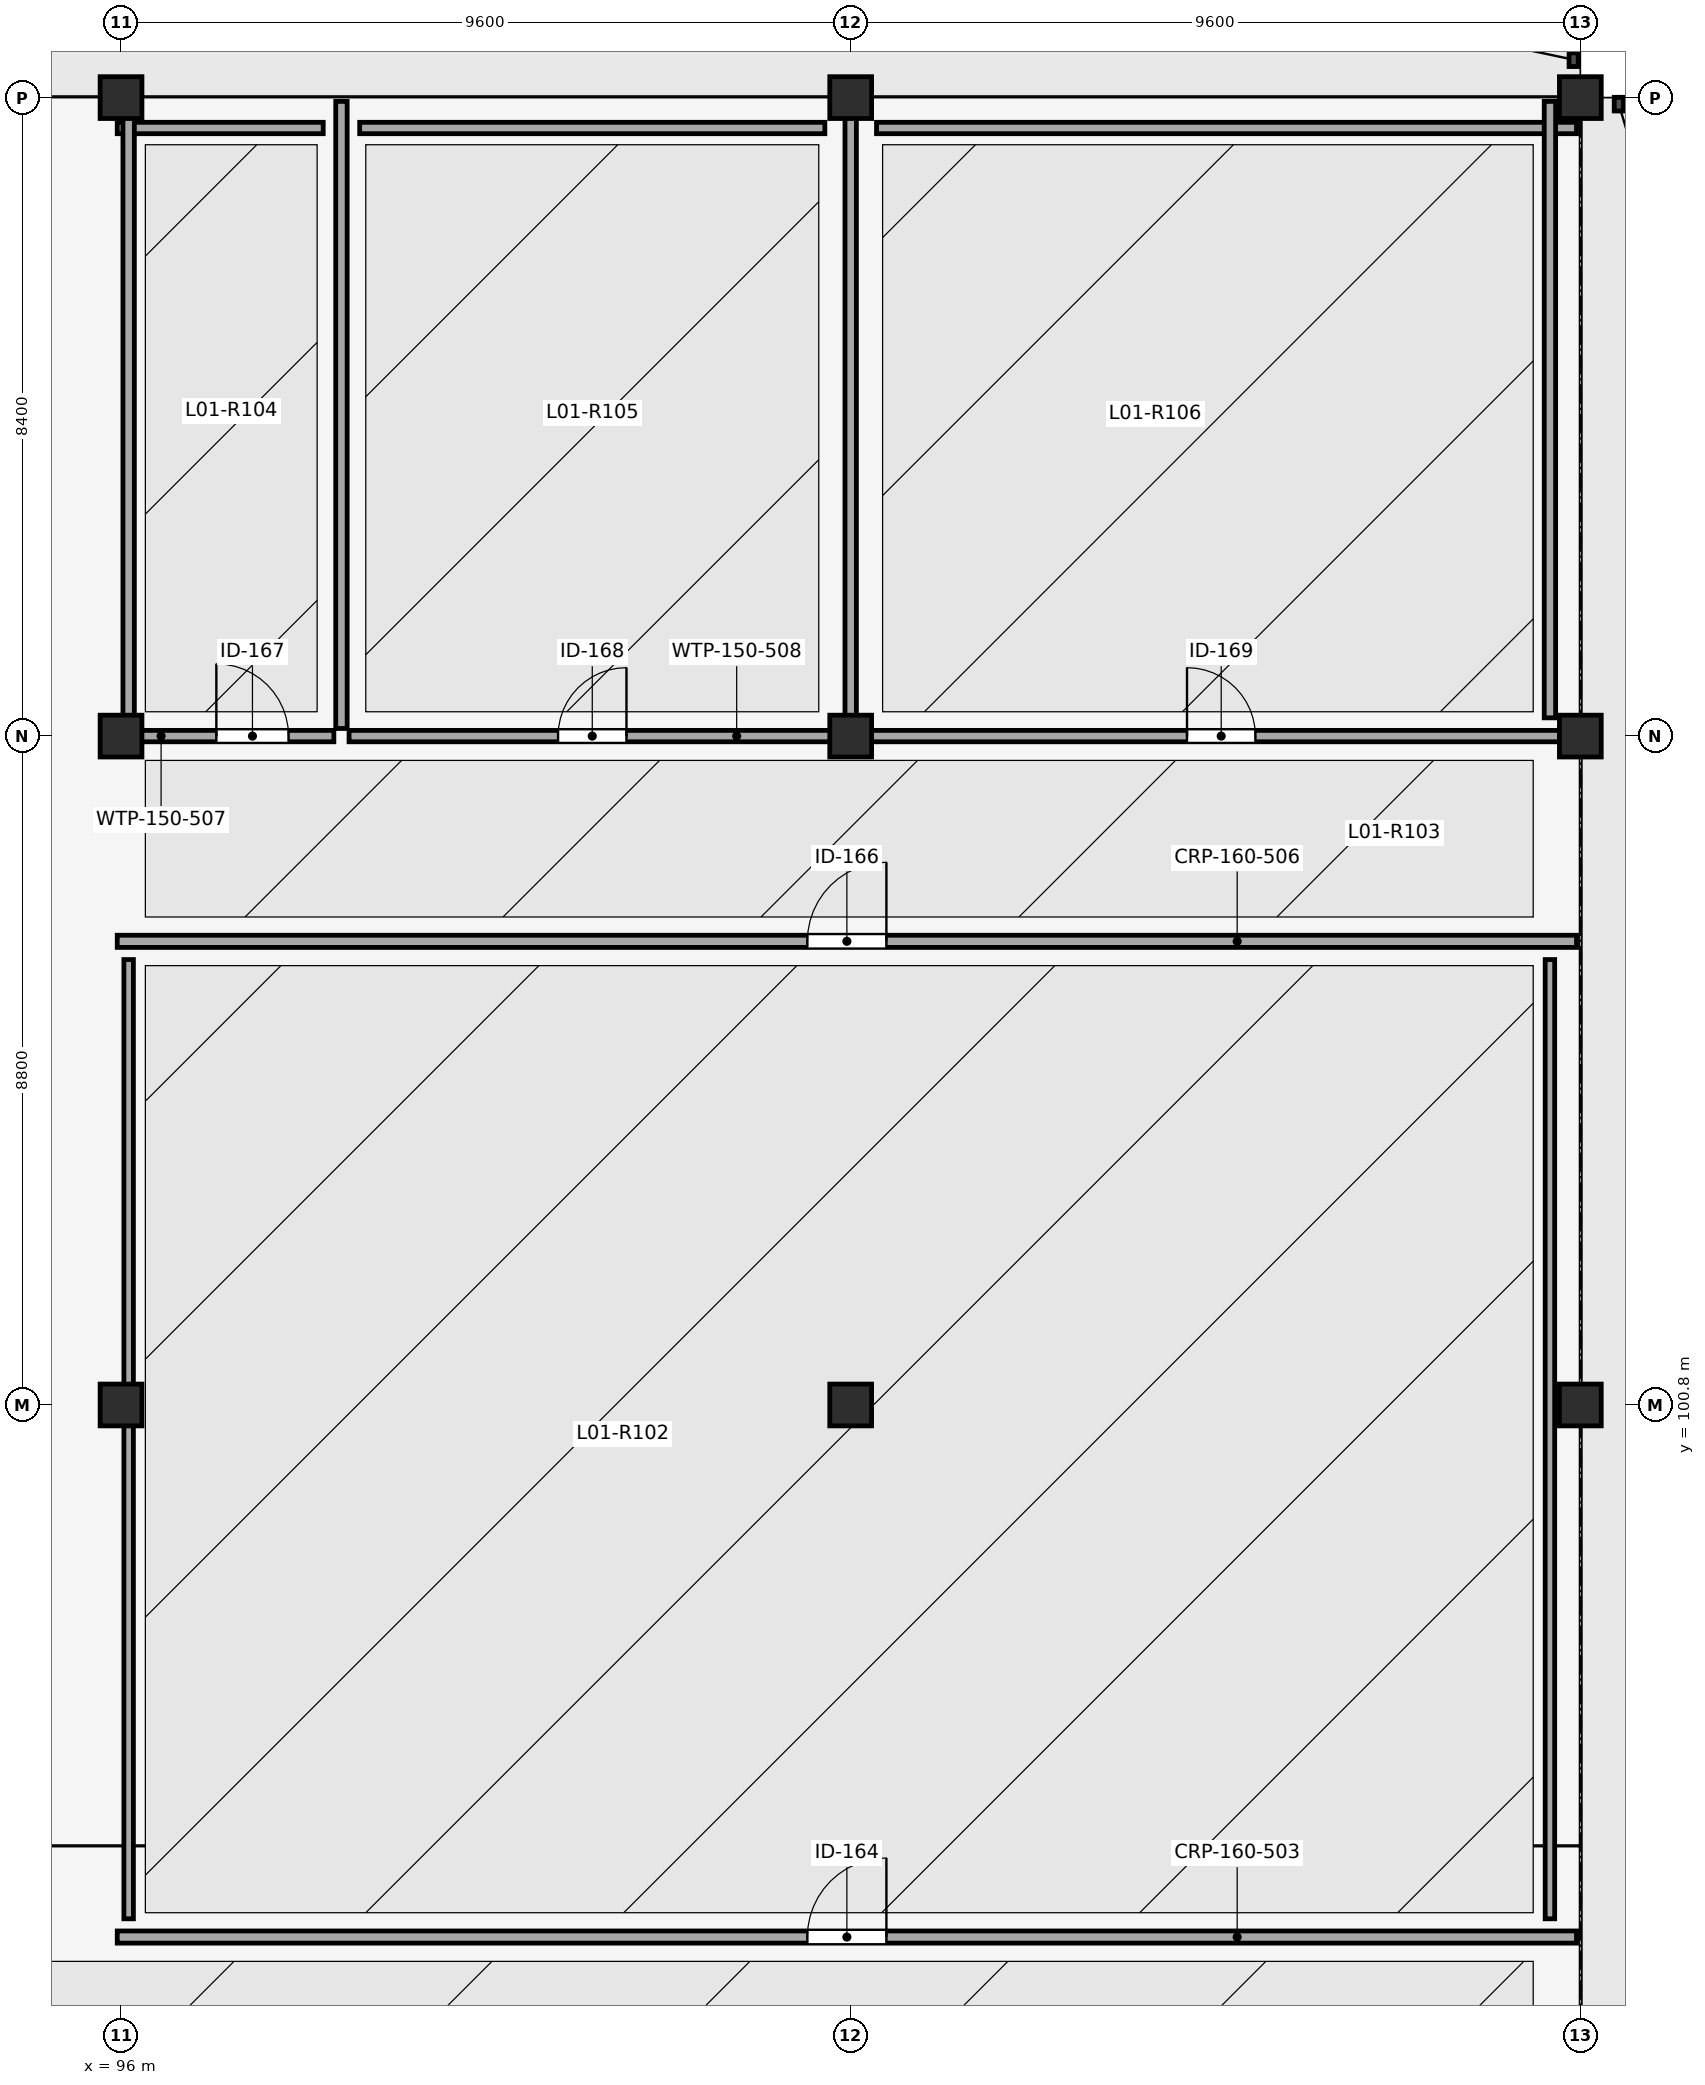
"""IFC4 building model, lengths in metres.
Left out: names, types, materials, properties, quantities, classifications, styles, units other than length and angle.
Written with IfcOpenShell. Run it as: python <this file> out.ifc"""

import sys

from ifc_helpers import new_model, si_unit, direction, frame, frame_2d, origin, origin_2d, place, context, subcontext, project, spatial, rectangle, extrude, element, fill, save


model = new_model("IFC4")
c1 = context("Model", 3, precision=1e-05, world=origin(), true_north=direction((0.0, 1.0)))
c2 = subcontext(c1, "Body", "Model", "MODEL_VIEW")
j1 = project(units=[si_unit("LENGTHUNIT", "METRE"), si_unit("PLANEANGLEUNIT", "RADIAN")], contexts=[c1])
p1 = place(None, origin())
s1 = spatial("IfcSite", under=j1, at=p1, CompositionType="ELEMENT")
p2 = place(p1, origin())
s2 = spatial("IfcBuilding", under=s1, at=p2, CompositionType="ELEMENT")
p3 = place(p2, frame((0.0, 0.0, 4.8)))
s3 = spatial("IfcBuildingStorey", under=s2, at=p3, CompositionType="ELEMENT", Elevation=4.8)
for number, where, z_axis, x_axis in (
    (1, (96.0, 100.8, 0.0), (0.0, 0.0, 1.0), (1.0, 0.0, 0.0)),
    (2, (96.0, 109.6, 0.0), (0.0, 0.0, 1.0), (1.0, 0.0, 0.0)),
    (3, (96.0, 118.0, 0.0), (0.0, 0.0, 1.0), (1.0, 0.0, 0.0)),
    (4, (105.6, 100.8, 0.0), (0.0, 0.0, 1.0), (1.0, 0.0, 0.0)),
    (5, (105.6, 109.6, 0.0), (0.0, 0.0, 1.0), (1.0, 0.0, 0.0)),
    (6, (105.6, 118.0, 0.0), (0.0, 0.0, 1.0), (1.0, 0.0, 0.0)),
    (7, (115.2, 100.8, 0.0), (0.0, 0.0, 1.0), (1.0, 0.0, 0.0)),
    (8, (115.2, 109.6, 0.0), (0.0, 0.0, 1.0), (1.0, 0.0, 0.0)),
    (9, (115.2, 118.0, 0.0), (0.0, 0.0, 1.0), (1.0, 0.0, 0.0)),
):
    element("IfcColumn", number, at=place(p3, frame(where, z_axis=z_axis, x_axis=x_axis)), inside=s3, PredefinedType="COLUMN", context=c2, shape_type="SweptSolid", body=[
        extrude(rectangle(XDim=0.55, YDim=0.55, at=origin_2d()), origin(), (0.0, 0.0, 1.0), 4.8),
    ])
p4 = place(p3, frame((95.95, 93.8, 0.0), z_axis=(0.0, 0.0, 1.0), x_axis=(1.0, 0.0, 0.0)))
e10 = element("IfcWall", 10, at=p4, inside=s3, PredefinedType="PARTITIONING", context=c2, shape_type="SweptSolid", body=[
    extrude(rectangle(XDim=19.2, YDim=0.16, at=frame_2d((9.6, 0.0))), origin(), (0.0, 0.0, 1.0), 4.42),
])
p5 = place(p4, frame((9.08, 0.0, 0.0)))
e11 = element("IfcOpeningElement", 11, at=p5, cuts=e10, PredefinedType="OPENING", context=c2, shape_type="SweptSolid", body=[
    extrude(rectangle(XDim=1.04, YDim=2.18, at=frame_2d((0.52, 1.09))), frame((0.0, 0.09, 0.0), z_axis=(0.0, -1.0, 0.0), x_axis=(1.0, 0.0, 0.0)), (0.0, 0.0, 1.0), 0.18),
])
p6 = place(p3, frame((95.95, 106.9, 0.0), z_axis=(0.0, 0.0, 1.0), x_axis=(1.0, 0.0, 0.0)))
e12 = element("IfcWall", 12, at=p6, inside=s3, PredefinedType="PARTITIONING", context=c2, shape_type="SweptSolid", body=[
    extrude(rectangle(XDim=19.2, YDim=0.16, at=frame_2d((9.6, 0.0))), origin(), (0.0, 0.0, 1.0), 4.1),
])
p7 = place(p6, frame((9.08, 0.0, 0.0)))
e13 = element("IfcOpeningElement", 13, at=p7, cuts=e12, PredefinedType="OPENING", context=c2, shape_type="SweptSolid", body=[
    extrude(rectangle(XDim=1.04, YDim=2.18, at=frame_2d((0.52, 1.09))), frame((0.0, 0.09, 0.0), z_axis=(0.0, -1.0, 0.0), x_axis=(1.0, 0.0, 0.0)), (0.0, 0.0, 1.0), 0.18),
])
p8 = place(p3, frame((95.95, 109.6, 0.0), z_axis=(0.0, 0.0, 1.0), x_axis=(1.0, 0.0, 0.0)))
e14 = element("IfcWall", 14, at=p8, inside=s3, PredefinedType="PARTITIONING", context=c2, shape_type="SweptSolid", body=[
    extrude(rectangle(XDim=2.85, YDim=0.15, at=frame_2d((1.425, 0.0))), origin(), (0.0, 0.0, 1.0), 3.895),
])
p9 = place(p8, frame((1.304, 0.0, 0.0)))
e15 = element("IfcOpeningElement", 15, at=p9, cuts=e14, PredefinedType="OPENING", context=c2, shape_type="SweptSolid", body=[
    extrude(rectangle(XDim=0.95, YDim=2.15, at=frame_2d((0.475, 1.075))), frame((0.0, 0.085, 0.0), z_axis=(0.0, -1.0, 0.0), x_axis=(1.0, 0.0, 0.0)), (0.0, 0.0, 1.0), 0.17),
])
p10 = place(p3, frame((99.0, 109.6, 0.0), z_axis=(0.0, 0.0, 1.0), x_axis=(1.0, 0.0, 0.0)))
e16 = element("IfcWall", 16, at=p10, inside=s3, PredefinedType="PARTITIONING", context=c2, shape_type="SweptSolid", body=[
    extrude(rectangle(XDim=6.4, YDim=0.15, at=frame_2d((3.2, 0.0))), origin(), (0.0, 0.0, 1.0), 3.895),
])
p11 = place(p10, frame((2.75, 0.0, 0.0)))
e17 = element("IfcOpeningElement", 17, at=p11, cuts=e16, PredefinedType="OPENING", context=c2, shape_type="SweptSolid", body=[
    extrude(rectangle(XDim=0.9, YDim=2.15, at=frame_2d((0.45, 1.075))), frame((0.0, 0.085, 0.0), z_axis=(0.0, -1.0, 0.0), x_axis=(1.0, 0.0, 0.0)), (0.0, 0.0, 1.0), 0.17),
])
p12 = place(p3, frame((105.8, 109.6, 0.0), z_axis=(0.0, 0.0, 1.0), x_axis=(1.0, 0.0, 0.0)))
e18 = element("IfcWall", 18, at=p12, inside=s3, PredefinedType="PARTITIONING", context=c2, shape_type="SweptSolid", body=[
    extrude(rectangle(XDim=9.35, YDim=0.15, at=frame_2d((4.675, 0.0))), origin(), (0.0, 0.0, 1.0), 3.895),
])
p13 = place(p12, frame((4.225, 0.0, 0.0)))
e19 = element("IfcOpeningElement", 19, at=p13, cuts=e18, PredefinedType="OPENING", context=c2, shape_type="SweptSolid", body=[
    extrude(rectangle(XDim=0.9, YDim=2.15, at=frame_2d((0.45, 1.075))), frame((0.0, 0.085, 0.0), z_axis=(0.0, -1.0, 0.0), x_axis=(1.0, 0.0, 0.0)), (0.0, 0.0, 1.0), 0.17),
])
p14 = place(p3, frame((98.9, 109.7, 0.0), z_axis=(0.0, 0.0, 1.0), x_axis=(0.0, 1.0, 0.0)))
e20 = element("IfcWall", 20, at=p14, inside=s3, PredefinedType="PARTITIONING", context=c2, shape_type="SweptSolid", body=[
    extrude(rectangle(XDim=8.25, YDim=0.15, at=frame_2d((4.125, 0.0))), origin(), (0.0, 0.0, 1.0), 4.42),
])
p15 = place(p3, frame((105.6, 109.7, 0.0), z_axis=(0.0, 0.0, 1.0), x_axis=(0.0, 1.0, 0.0)))
e21 = element("IfcWall", 21, at=p15, inside=s3, PredefinedType="PARTITIONING", context=c2, shape_type="SweptSolid", body=[
    extrude(rectangle(XDim=8.25, YDim=0.15, at=frame_2d((4.125, 0.0))), origin(), (0.0, 0.0, 1.0), 4.037),
])
p16 = place(p3, frame((96.1, 94.04, 0.0), z_axis=(0.0, 0.0, 1.0), x_axis=(0.0, 1.0, 0.0)))
e22 = element("IfcWall", 22, at=p16, inside=s3, PredefinedType="PARTITIONING", context=c2, shape_type="SweptSolid", body=[
    extrude(rectangle(XDim=12.62, YDim=0.125, at=frame_2d((6.31, 0.0))), origin(), (0.0, 0.0, 1.0), 4.037),
])
p17 = place(p3, frame((114.8, 94.04, 0.0), z_axis=(0.0, 0.0, 1.0), x_axis=(0.0, 1.0, 0.0)))
e23 = element("IfcWall", 23, at=p17, inside=s3, PredefinedType="PARTITIONING", context=c2, shape_type="SweptSolid", body=[
    extrude(rectangle(XDim=12.62, YDim=0.125, at=frame_2d((6.31, 0.0))), origin(), (0.0, 0.0, 1.0), 4.42),
])
p18 = place(p3, frame((95.95, 117.6, 0.0), z_axis=(0.0, 0.0, 1.0), x_axis=(1.0, 0.0, 0.0)))
e24 = element("IfcWall", 24, at=p18, inside=s3, PredefinedType="PARTITIONING", context=c2, shape_type="SweptSolid", body=[
    extrude(rectangle(XDim=2.71, YDim=0.15, at=frame_2d((1.355, 0.0))), origin(), (0.0, 0.0, 1.0), 4.42),
])
p19 = place(p3, frame((96.1, 109.84, 0.0), z_axis=(0.0, 0.0, 1.0), x_axis=(0.0, 1.0, 0.0)))
e25 = element("IfcWall", 25, at=p19, inside=s3, PredefinedType="PARTITIONING", context=c2, shape_type="SweptSolid", body=[
    extrude(rectangle(XDim=8.11, YDim=0.15, at=frame_2d((4.055, 0.0))), origin(), (0.0, 0.0, 1.0), 4.037),
])
p20 = place(p3, frame((99.14, 117.6, 0.0), z_axis=(0.0, 0.0, 1.0), x_axis=(1.0, 0.0, 0.0)))
e26 = element("IfcWall", 26, at=p20, inside=s3, PredefinedType="PARTITIONING", context=c2, shape_type="SweptSolid", body=[
    extrude(rectangle(XDim=6.12, YDim=0.15, at=frame_2d((3.06, 0.0))), origin(), (0.0, 0.0, 1.0), 4.42),
])
p21 = place(p3, frame((105.94, 117.6, 0.0), z_axis=(0.0, 0.0, 1.0), x_axis=(1.0, 0.0, 0.0)))
e27 = element("IfcWall", 27, at=p21, inside=s3, PredefinedType="PARTITIONING", context=c2, shape_type="SweptSolid", body=[
    extrude(rectangle(XDim=9.21, YDim=0.15, at=frame_2d((4.605, 0.0))), origin(), (0.0, 0.0, 1.0), 4.42),
])
p22 = place(p3, frame((114.8, 109.84, 0.0), z_axis=(0.0, 0.0, 1.0), x_axis=(0.0, 1.0, 0.0)))
e28 = element("IfcWall", 28, at=p22, inside=s3, PredefinedType="PARTITIONING", context=c2, shape_type="SweptSolid", body=[
    extrude(rectangle(XDim=8.11, YDim=0.15, at=frame_2d((4.055, 0.0))), origin(), (0.0, 0.0, 1.0), 4.42),
])
p23 = place(p5, origin())
e29 = element("IfcDoor", 29, at=p23, inside=s3, OperationType="SINGLE_SWING_RIGHT", PredefinedType="DOOR", context=c2, shape_type="SweptSolid", body=[
    extrude(rectangle(XDim=1.04, YDim=2.18, at=frame_2d((0.52, 1.09))), frame((0.0, 0.025, 0.0), z_axis=(0.0, -1.0, 0.0), x_axis=(1.0, 0.0, 0.0)), (0.0, 0.0, 1.0), 0.05),
])
fill(e11, e29)
p24 = place(p7, origin())
e30 = element("IfcDoor", 30, at=p24, inside=s3, OperationType="SINGLE_SWING_RIGHT", PredefinedType="DOOR", context=c2, shape_type="SweptSolid", body=[
    extrude(rectangle(XDim=1.04, YDim=2.18, at=frame_2d((0.52, 1.09))), frame((0.0, 0.025, 0.0), z_axis=(0.0, -1.0, 0.0), x_axis=(1.0, 0.0, 0.0)), (0.0, 0.0, 1.0), 0.05),
])
fill(e13, e30)
p25 = place(p9, origin())
e31 = element("IfcDoor", 31, at=p25, inside=s3, OperationType="SINGLE_SWING_LEFT", PredefinedType="DOOR", context=c2, shape_type="SweptSolid", body=[
    extrude(rectangle(XDim=0.95, YDim=2.15, at=frame_2d((0.475, 1.075))), frame((0.0, 0.025, 0.0), z_axis=(0.0, -1.0, 0.0), x_axis=(1.0, 0.0, 0.0)), (0.0, 0.0, 1.0), 0.05),
])
fill(e15, e31)
p26 = place(p11, origin())
e32 = element("IfcDoor", 32, at=p26, inside=s3, OperationType="SINGLE_SWING_RIGHT", PredefinedType="DOOR", context=c2, shape_type="SweptSolid", body=[
    extrude(rectangle(XDim=0.9, YDim=2.15, at=frame_2d((0.45, 1.075))), frame((0.0, 0.025, 0.0), z_axis=(0.0, -1.0, 0.0), x_axis=(1.0, 0.0, 0.0)), (0.0, 0.0, 1.0), 0.05),
])
fill(e17, e32)
p27 = place(p13, origin())
e33 = element("IfcDoor", 33, at=p27, inside=s3, OperationType="SINGLE_SWING_LEFT", PredefinedType="DOOR", context=c2, shape_type="SweptSolid", body=[
    extrude(rectangle(XDim=0.9, YDim=2.15, at=frame_2d((0.45, 1.075))), frame((0.0, 0.025, 0.0), z_axis=(0.0, -1.0, 0.0), x_axis=(1.0, 0.0, 0.0)), (0.0, 0.0, 1.0), 0.05),
])
fill(e19, e33)
save(model, sys.argv[1])
